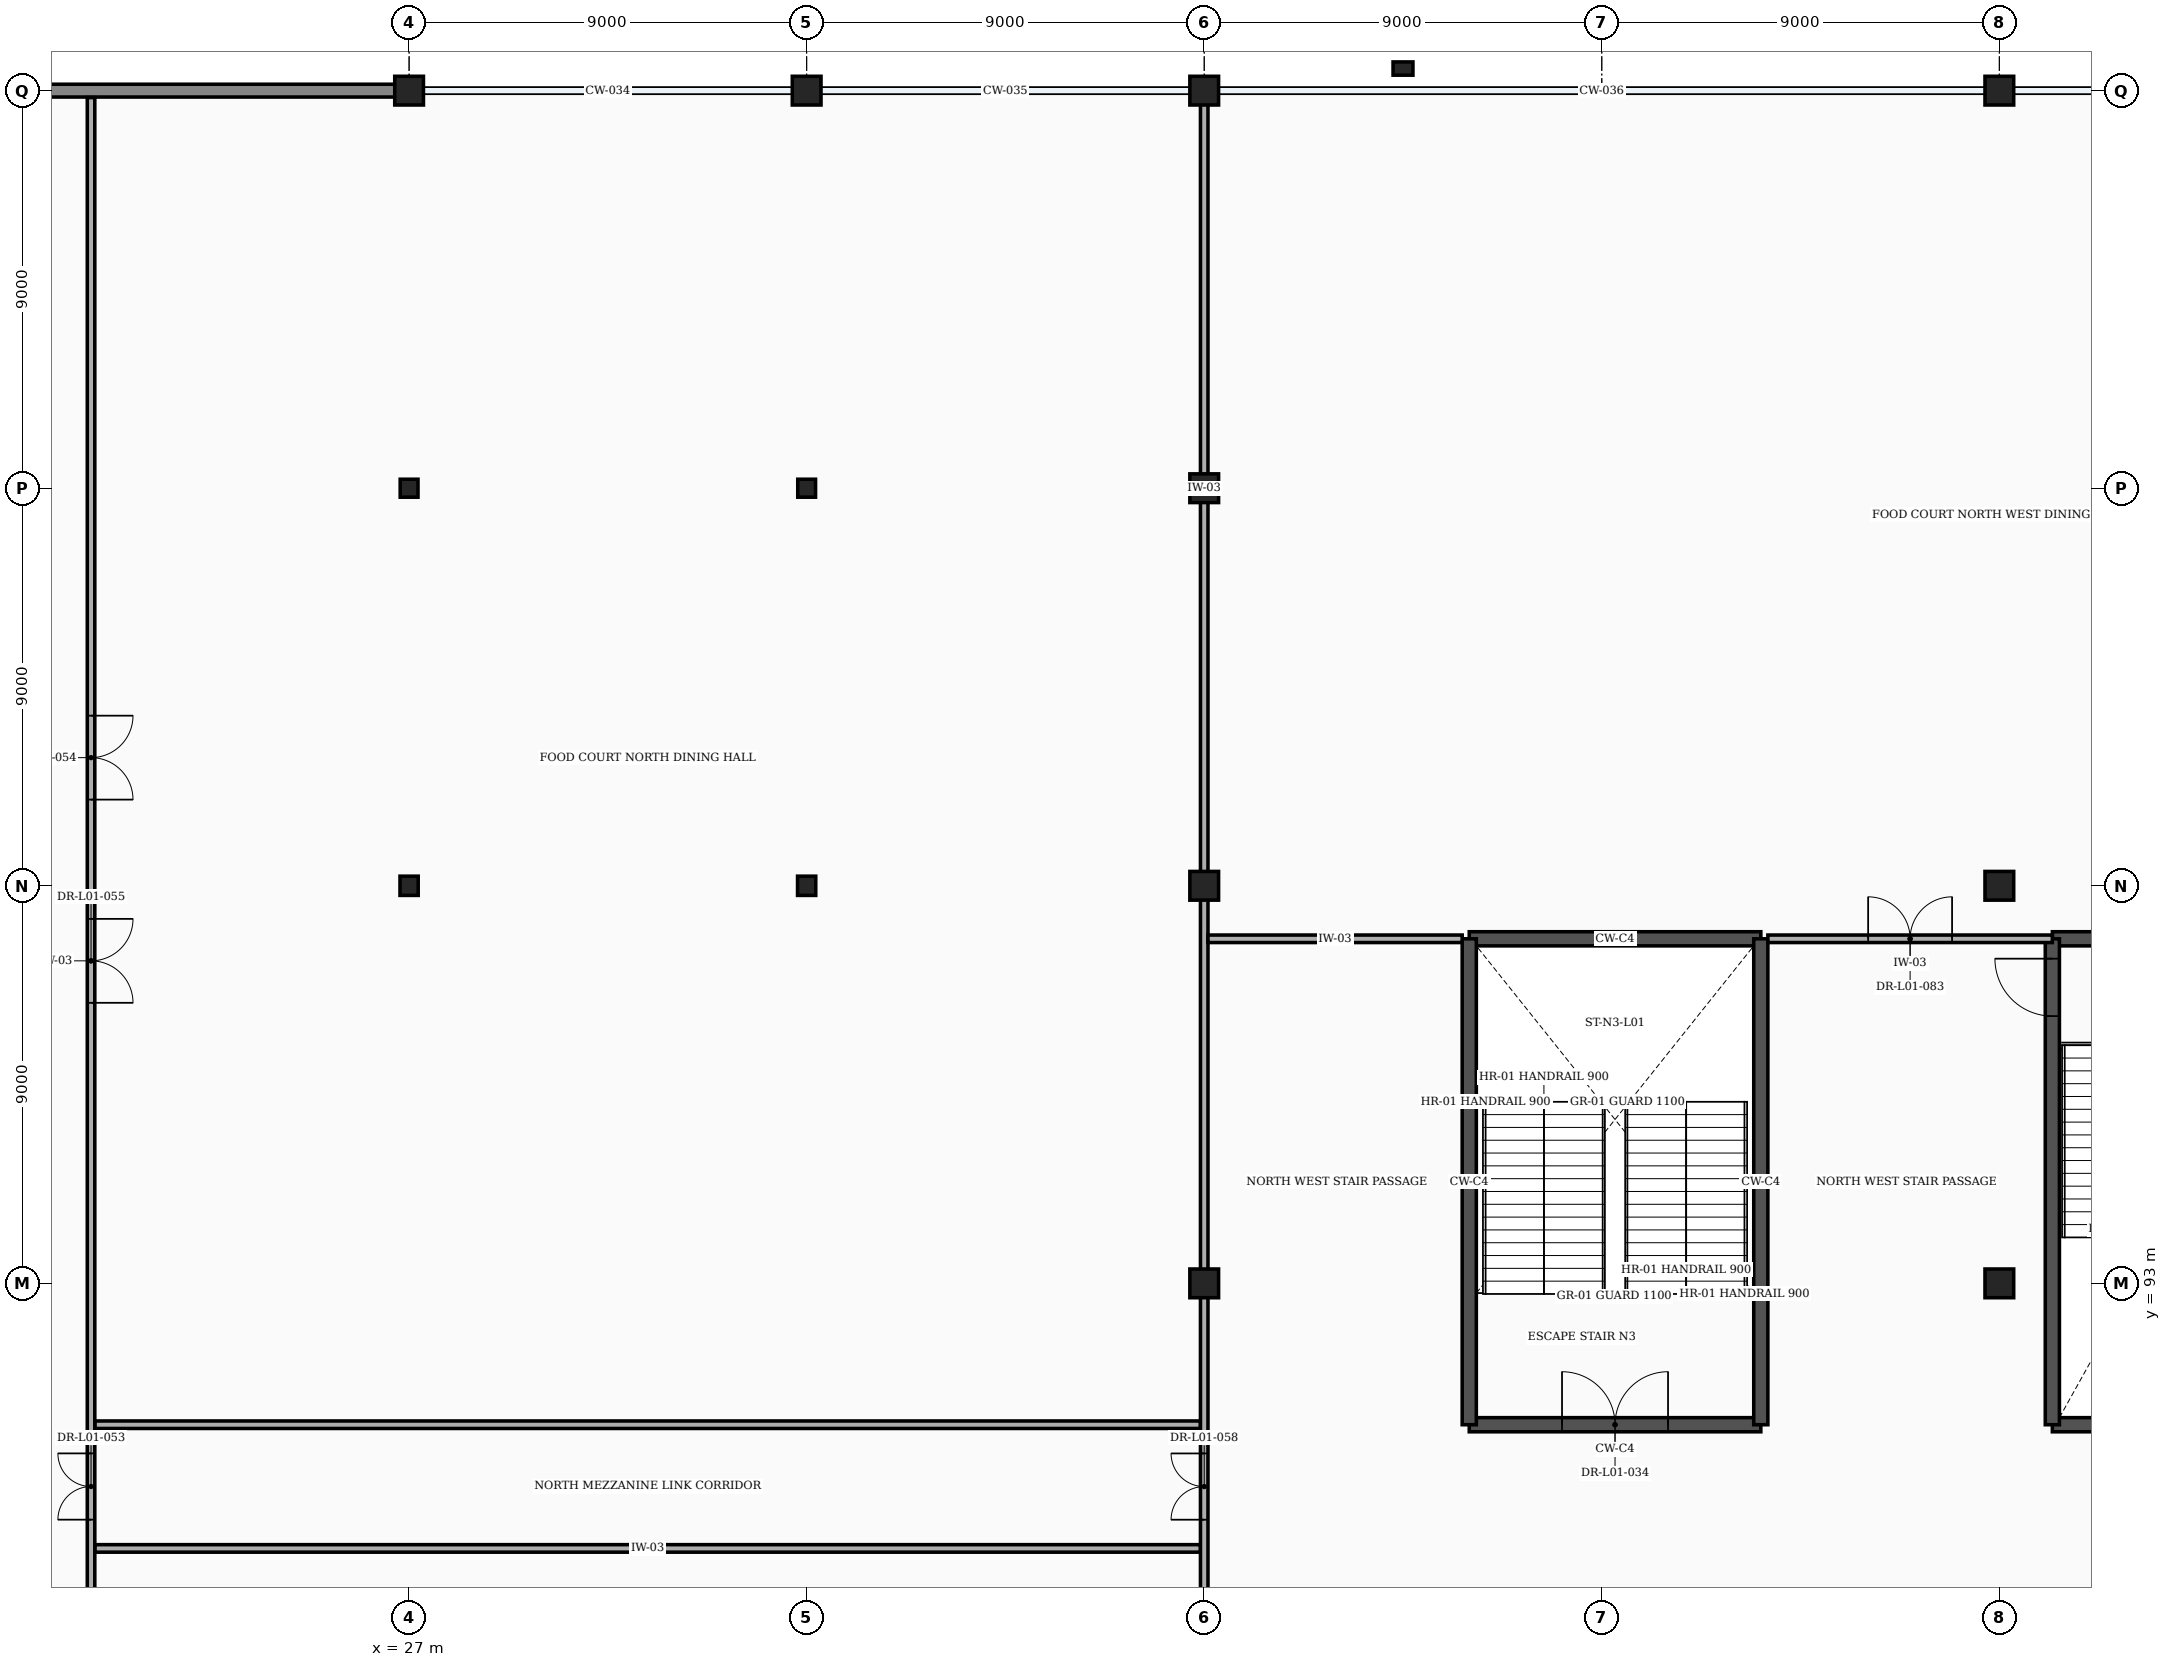
"""IFC4 building model, lengths in metres.
Left out: names, types, materials, properties, quantities, classifications, styles, units other than length and angle.
Written with IfcOpenShell. Run it as: python <this file> out.ifc"""

import sys

from ifc_helpers import new_model, si_unit, direction, frame, frame_2d, origin, origin_2d, place, context, subcontext, project, spatial, rectangle, i_section, extrude, element, fill, save


model = new_model("IFC4")
c1 = context("Model", 3, precision=1e-05, world=origin(), true_north=direction((0.0, 1.0)))
c2 = subcontext(c1, "Body", "Model", "MODEL_VIEW")
j1 = project(units=[si_unit("LENGTHUNIT", "METRE"), si_unit("PLANEANGLEUNIT", "RADIAN")], contexts=[c1])
p1 = place(None, origin())
s1 = spatial("IfcSite", under=j1, at=p1, CompositionType="ELEMENT")
p2 = place(p1, origin())
s2 = spatial("IfcBuilding", under=s1, at=p2, CompositionType="ELEMENT")
p3 = place(p2, frame((0.0, 0.0, 6.0)))
s3 = spatial("IfcBuildingStorey", under=s2, at=p3, CompositionType="ELEMENT", Elevation=6.0)
p4 = place(p3, frame((27.0, 102.0, 0.0), z_axis=(0.0, 0.0, 1.0), x_axis=(1.0, 0.0, 0.0)))
e1 = element("IfcColumn", 1, at=p4, inside=s3, PredefinedType="COLUMN", context=c2, shape_type="SweptSolid", body=[
    extrude(i_section(OverallWidth=0.412, OverallDepth=0.435, WebThickness=0.036, FlangeThickness=0.058, at=origin_2d()), origin(), (0.0, 0.0, 1.0), 5.4),
])
p5 = place(p3, frame((27.0, 111.0, 0.0), z_axis=(0.0, 0.0, 1.0), x_axis=(1.0, 0.0, 0.0)))
e2 = element("IfcColumn", 2, at=p5, inside=s3, PredefinedType="COLUMN", context=c2, shape_type="SweptSolid", body=[
    extrude(i_section(OverallWidth=0.403, OverallDepth=0.406, WebThickness=0.027, FlangeThickness=0.043, at=origin_2d()), origin(), (0.0, 0.0, 1.0), 5.4),
])
p6 = place(p3, frame((27.0, 120.0, 0.0), z_axis=(0.0, 0.0, 1.0), x_axis=(1.0, 0.0, 0.0)))
e3 = element("IfcColumn", 3, at=p6, inside=s3, PredefinedType="COLUMN", context=c2, shape_type="SweptSolid", body=[
    extrude(rectangle(XDim=0.65, YDim=0.65, at=origin_2d()), origin(), (0.0, 0.0, 1.0), 5.4),
])
p7 = place(p3, frame((36.0, 102.0, 0.0), z_axis=(0.0, 0.0, 1.0), x_axis=(1.0, 0.0, 0.0)))
e4 = element("IfcColumn", 4, at=p7, inside=s3, PredefinedType="COLUMN", context=c2, shape_type="SweptSolid", body=[
    extrude(i_section(OverallWidth=0.412, OverallDepth=0.435, WebThickness=0.036, FlangeThickness=0.058, at=origin_2d()), origin(), (0.0, 0.0, 1.0), 5.4),
])
p8 = place(p3, frame((36.0, 111.0, 0.0), z_axis=(0.0, 0.0, 1.0), x_axis=(1.0, 0.0, 0.0)))
e5 = element("IfcColumn", 5, at=p8, inside=s3, PredefinedType="COLUMN", context=c2, shape_type="SweptSolid", body=[
    extrude(i_section(OverallWidth=0.403, OverallDepth=0.406, WebThickness=0.027, FlangeThickness=0.043, at=origin_2d()), origin(), (0.0, 0.0, 1.0), 5.4),
])
for number, where, z_axis, x_axis in (
    (6, (36.0, 120.0, 0.0), (0.0, 0.0, 1.0), (1.0, 0.0, 0.0)),
    (7, (45.0, 93.0, 0.0), (0.0, 0.0, 1.0), (1.0, 0.0, 0.0)),
    (8, (45.0, 102.0, 0.0), (0.0, 0.0, 1.0), (1.0, 0.0, 0.0)),
    (9, (45.0, 111.0, 0.0), (0.0, 0.0, 1.0), (1.0, 0.0, 0.0)),
    (10, (45.0, 120.0, 0.0), (0.0, 0.0, 1.0), (1.0, 0.0, 0.0)),
    (11, (63.0, 93.0, 0.0), (0.0, 0.0, 1.0), (1.0, 0.0, 0.0)),
    (12, (63.0, 102.0, 0.0), (0.0, 0.0, 1.0), (1.0, 0.0, 0.0)),
    (13, (63.0, 120.0, 0.0), (0.0, 0.0, 1.0), (1.0, 0.0, 0.0)),
):
    element("IfcColumn", number, at=place(p3, frame(where, z_axis=z_axis, x_axis=x_axis)), inside=s3, PredefinedType="COLUMN", context=c2, shape_type="SweptSolid", body=[
        extrude(rectangle(XDim=0.65, YDim=0.65, at=origin_2d()), origin(), (0.0, 0.0, 1.0), 5.4),
    ])
p9 = place(p3, frame((49.5, 120.5, 0.0), z_axis=(0.0, 0.0, 1.0), x_axis=(1.0, 0.0, 0.0)))
e14 = element("IfcColumn", 14, at=p9, inside=s3, PredefinedType="PILASTER", context=c2, shape_type="SweptSolid", body=[
    extrude(rectangle(XDim=0.45, YDim=0.3, at=origin_2d()), origin(), (0.0, 0.0, 1.0), 5.4),
])
p10 = place(p3, frame((9.317, 120.0, 0.0), z_axis=(0.0, 0.0, 1.0), x_axis=(1.0, 0.0, 0.0)))
e15 = element("IfcWall", 15, at=p10, inside=s3, PredefinedType="STANDARD", context=c2, shape_type="SweptSolid", body=[
    extrude(rectangle(XDim=17.366, YDim=0.29, at=frame_2d((8.683, 0.0))), origin(), (0.0, 0.0, 1.0), 4.388),
])
p11 = place(p10, frame((0.65, 0.0, 0.85)))
e16 = element("IfcOpeningElement", 16, at=p11, cuts=e15, PredefinedType="OPENING", context=c2, shape_type="SweptSolid", body=[
    extrude(rectangle(XDim=2.4, YDim=2.6, at=frame_2d((1.2, 1.3))), frame((0.0, 0.157, 0.0), z_axis=(0.0, -1.0, 0.0), x_axis=(1.0, 0.0, 0.0)), (0.0, 0.0, 1.0), 0.314),
])
for number, where, z_axis, x_axis in (
    (17, (64.2, 89.8, 0.0), (0.0, 0.0, 1.0), (1.0, 0.0, 0.0)),
    (18, (64.2, 100.8, 0.0), (0.0, 0.0, 1.0), (1.0, 0.0, 0.0)),
):
    element("IfcWall", number, at=place(p3, frame(where, z_axis=z_axis, x_axis=x_axis)), inside=s3, PredefinedType="SHEAR", context=c2, shape_type="SweptSolid", body=[
        extrude(rectangle(XDim=6.6, YDim=0.32, at=frame_2d((3.3, 0.0))), origin(), (0.0, 0.0, 1.0), 5.15),
    ])
p12 = place(p3, frame((64.2, 89.8, 0.0), z_axis=(0.0, 0.0, 1.0), x_axis=(0.0, 1.0, 0.0)))
e19 = element("IfcWall", 19, at=p12, inside=s3, PredefinedType="SHEAR", context=c2, shape_type="SweptSolid", body=[
    extrude(rectangle(XDim=11.0, YDim=0.32, at=frame_2d((5.5, 0.0))), origin(), (0.0, 0.0, 1.0), 5.15),
])
p13 = place(p12, frame((9.25, 0.0, 0.0)))
e20 = element("IfcOpeningElement", 20, at=p13, cuts=e19, PredefinedType="OPENING", context=c2, shape_type="SweptSolid", body=[
    extrude(rectangle(XDim=1.3, YDim=2.2, at=frame_2d((0.65, 1.1))), frame((0.0, 0.172, 0.0), z_axis=(0.0, -1.0, 0.0), x_axis=(1.0, 0.0, 0.0)), (0.0, 0.0, 1.0), 0.344),
])
p14 = place(p3, frame((51.0, 89.8, 0.0), z_axis=(0.0, 0.0, 1.0), x_axis=(1.0, 0.0, 0.0)))
e21 = element("IfcWall", 21, at=p14, inside=s3, PredefinedType="SHEAR", context=c2, shape_type="SweptSolid", body=[
    extrude(rectangle(XDim=6.6, YDim=0.32, at=frame_2d((3.3, 0.0))), origin(), (0.0, 0.0, 1.0), 5.15),
])
p15 = place(p14, frame((2.1, 0.0, 0.0)))
e22 = element("IfcOpeningElement", 22, at=p15, cuts=e21, PredefinedType="OPENING", context=c2, shape_type="SweptSolid", body=[
    extrude(rectangle(XDim=2.4, YDim=2.25, at=frame_2d((1.2, 1.125))), frame((0.0, 0.172, 0.0), z_axis=(0.0, -1.0, 0.0), x_axis=(1.0, 0.0, 0.0)), (0.0, 0.0, 1.0), 0.344),
])
p16 = place(p3, frame((51.0, 100.8, 0.0), z_axis=(0.0, 0.0, 1.0), x_axis=(1.0, 0.0, 0.0)))
e23 = element("IfcWall", 23, at=p16, inside=s3, PredefinedType="SHEAR", context=c2, shape_type="SweptSolid", body=[
    extrude(rectangle(XDim=6.6, YDim=0.32, at=frame_2d((3.3, 0.0))), origin(), (0.0, 0.0, 1.0), 5.15),
])
for number, where, z_axis, x_axis in (
    (24, (51.0, 89.8, 0.0), (0.0, 0.0, 1.0), (0.0, 1.0, 0.0)),
    (25, (57.6, 89.8, 0.0), (0.0, 0.0, 1.0), (0.0, 1.0, 0.0)),
):
    element("IfcWall", number, at=place(p3, frame(where, z_axis=z_axis, x_axis=x_axis)), inside=s3, PredefinedType="SHEAR", context=c2, shape_type="SweptSolid", body=[
        extrude(rectangle(XDim=11.0, YDim=0.32, at=frame_2d((5.5, 0.0))), origin(), (0.0, 0.0, 1.0), 5.15),
    ])
for number, where, z_axis, x_axis in (
    (26, (19.885, 87.0, 0.0), (0.0, 0.0, 1.0), (1.0, 0.0, 0.0)),
    (27, (19.885, 89.8, 0.0), (0.0, 0.0, 1.0), (1.0, 0.0, 0.0)),
):
    element("IfcWall", number, at=place(p3, frame(where, z_axis=z_axis, x_axis=x_axis)), inside=s3, PredefinedType="PARTITIONING", context=c2, shape_type="SweptSolid", body=[
        extrude(rectangle(XDim=25.03, YDim=0.17, at=frame_2d((12.515, 0.0))), origin(), (0.0, 0.0, 1.0), 5.15),
    ])
p17 = place(p3, frame((19.8, 80.76, 0.0), z_axis=(0.0, 0.0, 1.0), x_axis=(0.0, 1.0, 0.0)))
e28 = element("IfcWall", 28, at=p17, inside=s3, PredefinedType="PARTITIONING", context=c2, shape_type="SweptSolid", body=[
    extrude(rectangle(XDim=39.083, YDim=0.17, at=frame_2d((19.541, 0.0))), origin(), (0.0, 0.0, 1.0), 5.15),
])
p18 = place(p17, frame((6.891, 0.0, 0.0)))
e29 = element("IfcOpeningElement", 29, at=p18, cuts=e28, PredefinedType="OPENING", context=c2, shape_type="SweptSolid", body=[
    extrude(rectangle(XDim=1.5, YDim=2.2, at=frame_2d((0.75, 1.1))), frame((0.0, 0.097, 0.0), z_axis=(0.0, -1.0, 0.0), x_axis=(1.0, 0.0, 0.0)), (0.0, 0.0, 1.0), 0.194),
])
p19 = place(p17, frame((23.191, 0.0, 0.0)))
e30 = element("IfcOpeningElement", 30, at=p19, cuts=e28, PredefinedType="OPENING", context=c2, shape_type="SweptSolid", body=[
    extrude(rectangle(XDim=1.9, YDim=2.35, at=frame_2d((0.95, 1.175))), frame((0.0, 0.097, 0.0), z_axis=(0.0, -1.0, 0.0), x_axis=(1.0, 0.0, 0.0)), (0.0, 0.0, 1.0), 0.194),
])
p20 = place(p17, frame((18.591, 0.0, 0.0)))
e31 = element("IfcOpeningElement", 31, at=p20, cuts=e28, PredefinedType="OPENING", context=c2, shape_type="SweptSolid", body=[
    extrude(rectangle(XDim=1.9, YDim=2.35, at=frame_2d((0.95, 1.175))), frame((0.0, 0.097, 0.0), z_axis=(0.0, -1.0, 0.0), x_axis=(1.0, 0.0, 0.0)), (0.0, 0.0, 1.0), 0.194),
])
p21 = place(p17, frame((0.3, 0.0, 0.0)))
e32 = element("IfcOpeningElement", 32, at=p21, cuts=e28, PredefinedType="OPENING", context=c2, shape_type="SweptSolid", body=[
    extrude(rectangle(XDim=1.9, YDim=2.35, at=frame_2d((0.95, 1.175))), frame((0.0, 0.097, 0.0), z_axis=(0.0, -1.0, 0.0), x_axis=(1.0, 0.0, 0.0)), (0.0, 0.0, 1.0), 0.194),
])
p22 = place(p3, frame((45.0, 84.22, 0.0), z_axis=(0.0, 0.0, 1.0), x_axis=(0.0, 1.0, 0.0)))
e33 = element("IfcWall", 33, at=p22, inside=s3, PredefinedType="PARTITIONING", context=c2, shape_type="SweptSolid", body=[
    extrude(rectangle(XDim=8.56, YDim=0.17, at=frame_2d((4.28, 0.0))), origin(), (0.0, 0.0, 1.0), 4.617),
])
p23 = place(p22, frame((3.43, 0.0, 0.0)))
e34 = element("IfcOpeningElement", 34, at=p23, cuts=e33, PredefinedType="OPENING", context=c2, shape_type="SweptSolid", body=[
    extrude(rectangle(XDim=1.5, YDim=2.2, at=frame_2d((0.75, 1.1))), frame((0.0, 0.097, 0.0), z_axis=(0.0, -1.0, 0.0), x_axis=(1.0, 0.0, 0.0)), (0.0, 0.0, 1.0), 0.194),
])
p24 = place(p3, frame((45.0, 93.22, 0.0), z_axis=(0.0, 0.0, 1.0), x_axis=(0.0, 1.0, 0.0)))
e35 = element("IfcWall", 35, at=p24, inside=s3, PredefinedType="PARTITIONING", context=c2, shape_type="SweptSolid", body=[
    extrude(rectangle(XDim=8.56, YDim=0.17, at=frame_2d((4.28, 0.0))), origin(), (0.0, 0.0, 1.0), 4.617),
])
p25 = place(p3, frame((45.0, 102.22, 0.0), z_axis=(0.0, 0.0, 1.0), x_axis=(0.0, 1.0, 0.0)))
e36 = element("IfcWall", 36, at=p25, inside=s3, PredefinedType="PARTITIONING", context=c2, shape_type="SweptSolid", body=[
    extrude(rectangle(XDim=17.56, YDim=0.17, at=frame_2d((8.78, 0.0))), origin(), (0.0, 0.0, 1.0), 4.617),
])
p26 = place(p3, frame((45.085, 100.8, 0.0), z_axis=(0.0, 0.0, 1.0), x_axis=(1.0, 0.0, 0.0)))
e37 = element("IfcWall", 37, at=p26, inside=s3, PredefinedType="PARTITIONING", context=c2, shape_type="SweptSolid", body=[
    extrude(rectangle(XDim=5.755, YDim=0.17, at=frame_2d((2.877, 0.0))), origin(), (0.0, 0.0, 1.0), 5.15),
])
p27 = place(p3, frame((57.76, 100.8, 0.0), z_axis=(0.0, 0.0, 1.0), x_axis=(1.0, 0.0, 0.0)))
e38 = element("IfcWall", 38, at=p27, inside=s3, PredefinedType="PARTITIONING", context=c2, shape_type="SweptSolid", body=[
    extrude(rectangle(XDim=6.44, YDim=0.17, at=frame_2d((3.22, 0.0))), origin(), (0.0, 0.0, 1.0), 5.15),
])
p28 = place(p27, frame((2.27, 0.0, 0.0)))
e39 = element("IfcOpeningElement", 39, at=p28, cuts=e38, PredefinedType="OPENING", context=c2, shape_type="SweptSolid", body=[
    extrude(rectangle(XDim=1.9, YDim=2.35, at=frame_2d((0.95, 1.175))), frame((0.0, 0.097, 0.0), z_axis=(0.0, -1.0, 0.0), x_axis=(1.0, 0.0, 0.0)), (0.0, 0.0, 1.0), 0.194),
])
p29 = place(p13, origin())
e40 = element("IfcDoor", 40, at=p29, inside=s3, OperationType="SINGLE_SWING_RIGHT", PredefinedType="DOOR", context=c2, shape_type="SweptSolid", body=[
    extrude(rectangle(XDim=1.3, YDim=2.2, at=frame_2d((0.65, 1.1))), frame((0.0, 0.025, 0.0), z_axis=(0.0, -1.0, 0.0), x_axis=(1.0, 0.0, 0.0)), (0.0, 0.0, 1.0), 0.05),
])
fill(e20, e40)
p30 = place(p15, origin())
e41 = element("IfcDoor", 41, at=p30, inside=s3, OperationType="DOUBLE_DOOR_SINGLE_SWING", PredefinedType="DOOR", context=c2, shape_type="SweptSolid", body=[
    extrude(rectangle(XDim=2.4, YDim=2.25, at=frame_2d((1.2, 1.125))), frame((0.0, 0.025, 0.0), z_axis=(0.0, -1.0, 0.0), x_axis=(1.0, 0.0, 0.0)), (0.0, 0.0, 1.0), 0.05),
])
fill(e22, e41)
p31 = place(p18, origin())
e42 = element("IfcDoor", 42, at=p31, inside=s3, OperationType="DOUBLE_DOOR_SINGLE_SWING", PredefinedType="DOOR", context=c2, shape_type="SweptSolid", body=[
    extrude(rectangle(XDim=1.5, YDim=2.2, at=frame_2d((0.75, 1.1))), frame((0.0, 0.025, 0.0), z_axis=(0.0, -1.0, 0.0), x_axis=(1.0, 0.0, 0.0)), (0.0, 0.0, 1.0), 0.05),
])
fill(e29, e42)
p32 = place(p19, frame((1.9, 0.0, 0.0), z_axis=(0.0, 0.0, 1.0), x_axis=(-1.0, 0.0, 0.0)))
e43 = element("IfcDoor", 43, at=p32, inside=s3, OperationType="DOUBLE_DOOR_SINGLE_SWING", PredefinedType="DOOR", context=c2, shape_type="SweptSolid", body=[
    extrude(rectangle(XDim=1.9, YDim=2.35, at=frame_2d((0.95, 1.175))), frame((0.0, 0.025, 0.0), z_axis=(0.0, -1.0, 0.0), x_axis=(1.0, 0.0, 0.0)), (0.0, 0.0, 1.0), 0.05),
])
fill(e30, e43)
p33 = place(p20, frame((1.9, 0.0, 0.0), z_axis=(0.0, 0.0, 1.0), x_axis=(-1.0, 0.0, 0.0)))
e44 = element("IfcDoor", 44, at=p33, inside=s3, OperationType="DOUBLE_DOOR_SINGLE_SWING", PredefinedType="DOOR", context=c2, shape_type="SweptSolid", body=[
    extrude(rectangle(XDim=1.9, YDim=2.35, at=frame_2d((0.95, 1.175))), frame((0.0, 0.025, 0.0), z_axis=(0.0, -1.0, 0.0), x_axis=(1.0, 0.0, 0.0)), (0.0, 0.0, 1.0), 0.05),
])
fill(e31, e44)
p34 = place(p23, origin())
e45 = element("IfcDoor", 45, at=p34, inside=s3, OperationType="DOUBLE_DOOR_SINGLE_SWING", PredefinedType="DOOR", context=c2, shape_type="SweptSolid", body=[
    extrude(rectangle(XDim=1.5, YDim=2.2, at=frame_2d((0.75, 1.1))), frame((0.0, 0.025, 0.0), z_axis=(0.0, -1.0, 0.0), x_axis=(1.0, 0.0, 0.0)), (0.0, 0.0, 1.0), 0.05),
])
fill(e34, e45)
p35 = place(p28, origin())
e46 = element("IfcDoor", 46, at=p35, inside=s3, OperationType="DOUBLE_DOOR_SINGLE_SWING", PredefinedType="DOOR", context=c2, shape_type="SweptSolid", body=[
    extrude(rectangle(XDim=1.9, YDim=2.35, at=frame_2d((0.95, 1.175))), frame((0.0, 0.025, 0.0), z_axis=(0.0, -1.0, 0.0), x_axis=(1.0, 0.0, 0.0)), (0.0, 0.0, 1.0), 0.05),
])
fill(e39, e46)
save(model, sys.argv[1])
